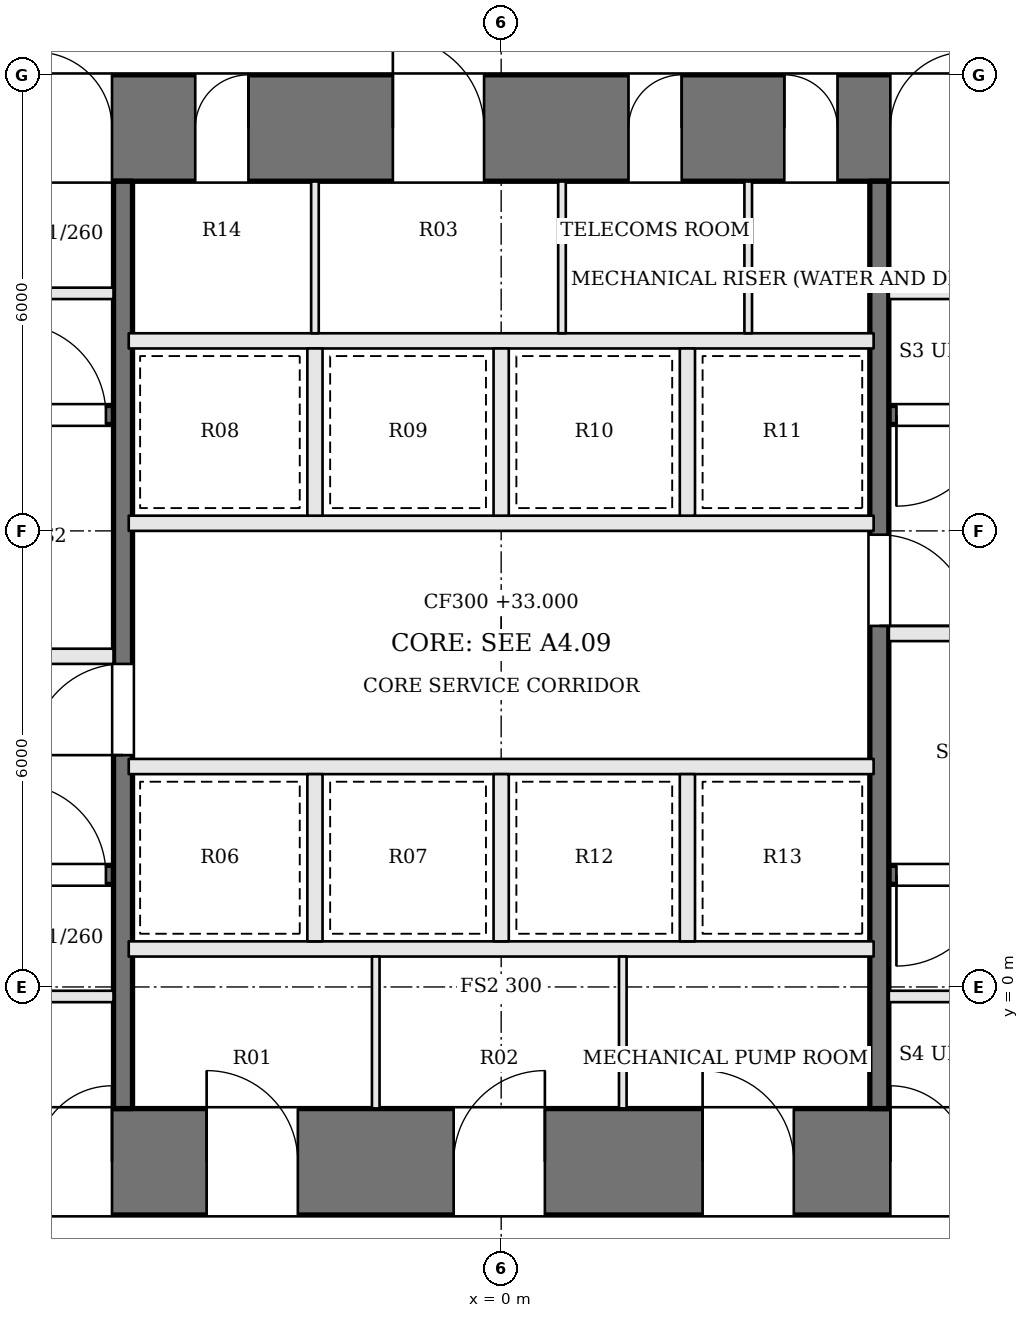
"""IFC4 building model, lengths in metres.
Left out: names, types, materials, properties, quantities, classifications, styles, units other than length and angle.
Written with IfcOpenShell. Run it as: python <this file> out.ifc"""

import sys

from ifc_helpers import new_model, si_unit, direction, frame, frame_2d, origin, place, context, subcontext, project, spatial, rectangle, extrude, element, fill, save


model = new_model("IFC4")
c1 = context("Model", 3, precision=1e-05, world=origin(), true_north=direction((0.0, 1.0)))
c2 = subcontext(c1, "Body", "Model", "MODEL_VIEW")
j1 = project(units=[si_unit("LENGTHUNIT", "METRE"), si_unit("PLANEANGLEUNIT", "RADIAN")], contexts=[c1])
p1 = place(None, origin())
s1 = spatial("IfcSite", under=j1, at=p1, CompositionType="ELEMENT")
p2 = place(p1, origin())
s2 = spatial("IfcBuilding", under=s1, at=p2, CompositionType="ELEMENT")
p3 = place(p2, frame((0.0, 0.0, 33.0)))
s3 = spatial("IfcBuildingStorey", under=s2, at=p3, CompositionType="ELEMENT", Elevation=33.0)
p4 = place(p3, frame((-13.0, 11.3, 0.0), z_axis=(0.0, 0.0, 1.0), x_axis=(1.0, 0.0, 0.0)))
e1 = element("IfcWall", 1, at=p4, inside=s3, PredefinedType="SHEAR", context=c2, shape_type="SweptSolid", body=[
    extrude(rectangle(XDim=26.0, YDim=1.4, at=frame_2d((13.0, 0.0))), origin(), (0.0, 0.0, 1.0), 4.5),
])
p5 = place(p4, frame((8.975, 0.0, 0.0)))
e2 = element("IfcOpeningElement", 2, at=p5, cuts=e1, PredefinedType="OPENING", context=c2, shape_type="SweptSolid", body=[
    extrude(rectangle(XDim=0.7, YDim=2.1, at=frame_2d((0.35, 1.05))), frame((0.0, 0.71, 0.0), z_axis=(0.0, -1.0, 0.0), x_axis=(1.0, 0.0, 0.0)), (0.0, 0.0, 1.0), 1.42),
])
p6 = place(p4, frame((11.575, 0.0, 0.0)))
e3 = element("IfcOpeningElement", 3, at=p6, cuts=e1, PredefinedType="OPENING", context=c2, shape_type="SweptSolid", body=[
    extrude(rectangle(XDim=1.2, YDim=2.1, at=frame_2d((0.6, 1.05))), frame((0.0, 0.71, 0.0), z_axis=(0.0, -1.0, 0.0), x_axis=(1.0, 0.0, 0.0)), (0.0, 0.0, 1.0), 1.42),
])
p7 = place(p4, frame((14.675, 0.0, 0.0)))
e4 = element("IfcOpeningElement", 4, at=p7, cuts=e1, PredefinedType="OPENING", context=c2, shape_type="SweptSolid", body=[
    extrude(rectangle(XDim=0.7, YDim=2.1, at=frame_2d((0.35, 1.05))), frame((0.0, 0.71, 0.0), z_axis=(0.0, -1.0, 0.0), x_axis=(1.0, 0.0, 0.0)), (0.0, 0.0, 1.0), 1.42),
])
p8 = place(p4, frame((16.725, 0.0, 0.0)))
e5 = element("IfcOpeningElement", 5, at=p8, cuts=e1, PredefinedType="OPENING", context=c2, shape_type="SweptSolid", body=[
    extrude(rectangle(XDim=0.7, YDim=2.1, at=frame_2d((0.35, 1.05))), frame((0.0, 0.71, 0.0), z_axis=(0.0, -1.0, 0.0), x_axis=(1.0, 0.0, 0.0)), (0.0, 0.0, 1.0), 1.42),
])
p9 = place(p4, frame((6.88, 0.0, 0.0)))
e6 = element("IfcOpeningElement", 6, at=p9, cuts=e1, PredefinedType="OPENING", context=c2, shape_type="SweptSolid", body=[
    extrude(rectangle(XDim=1.0, YDim=2.1, at=frame_2d((0.5, 1.05))), frame((0.0, 0.71, 0.0), z_axis=(0.0, -1.0, 0.0), x_axis=(1.0, 0.0, 0.0)), (0.0, 0.0, 1.0), 1.42),
])
p10 = place(p4, frame((18.12, 0.0, 0.0)))
e7 = element("IfcOpeningElement", 7, at=p10, cuts=e1, PredefinedType="OPENING", context=c2, shape_type="SweptSolid", body=[
    extrude(rectangle(XDim=1.0, YDim=2.1, at=frame_2d((0.5, 1.05))), frame((0.0, 0.71, 0.0), z_axis=(0.0, -1.0, 0.0), x_axis=(1.0, 0.0, 0.0)), (0.0, 0.0, 1.0), 1.42),
])
p11 = place(p3, frame((-13.0, -2.3, 0.0), z_axis=(0.0, 0.0, 1.0), x_axis=(1.0, 0.0, 0.0)))
e8 = element("IfcWall", 8, at=p11, inside=s3, PredefinedType="SHEAR", context=c2, shape_type="SweptSolid", body=[
    extrude(rectangle(XDim=26.0, YDim=1.4, at=frame_2d((13.0, 0.0))), origin(), (0.0, 0.0, 1.0), 4.5),
])
p12 = place(p11, frame((9.125, 0.0, 0.0)))
e9 = element("IfcOpeningElement", 9, at=p12, cuts=e8, PredefinedType="OPENING", context=c2, shape_type="SweptSolid", body=[
    extrude(rectangle(XDim=1.2, YDim=2.1, at=frame_2d((0.6, 1.05))), frame((0.0, 0.71, 0.0), z_axis=(0.0, -1.0, 0.0), x_axis=(1.0, 0.0, 0.0)), (0.0, 0.0, 1.0), 1.42),
])
p13 = place(p11, frame((12.375, 0.0, 0.0)))
e10 = element("IfcOpeningElement", 10, at=p13, cuts=e8, PredefinedType="OPENING", context=c2, shape_type="SweptSolid", body=[
    extrude(rectangle(XDim=1.2, YDim=2.1, at=frame_2d((0.6, 1.05))), frame((0.0, 0.71, 0.0), z_axis=(0.0, -1.0, 0.0), x_axis=(1.0, 0.0, 0.0)), (0.0, 0.0, 1.0), 1.42),
])
p14 = place(p11, frame((15.65, 0.0, 0.0)))
e11 = element("IfcOpeningElement", 11, at=p14, cuts=e8, PredefinedType="OPENING", context=c2, shape_type="SweptSolid", body=[
    extrude(rectangle(XDim=1.2, YDim=2.1, at=frame_2d((0.6, 1.05))), frame((0.0, 0.71, 0.0), z_axis=(0.0, -1.0, 0.0), x_axis=(1.0, 0.0, 0.0)), (0.0, 0.0, 1.0), 1.42),
])
p15 = place(p11, frame((6.88, 0.0, 0.0)))
e12 = element("IfcOpeningElement", 12, at=p15, cuts=e8, PredefinedType="OPENING", context=c2, shape_type="SweptSolid", body=[
    extrude(rectangle(XDim=1.0, YDim=2.1, at=frame_2d((0.5, 1.05))), frame((0.0, 0.71, 0.0), z_axis=(0.0, -1.0, 0.0), x_axis=(1.0, 0.0, 0.0)), (0.0, 0.0, 1.0), 1.42),
])
p16 = place(p11, frame((18.12, 0.0, 0.0)))
e13 = element("IfcOpeningElement", 13, at=p16, cuts=e8, PredefinedType="OPENING", context=c2, shape_type="SweptSolid", body=[
    extrude(rectangle(XDim=1.0, YDim=2.1, at=frame_2d((0.5, 1.05))), frame((0.0, 0.71, 0.0), z_axis=(0.0, -1.0, 0.0), x_axis=(1.0, 0.0, 0.0)), (0.0, 0.0, 1.0), 1.42),
])
for number, where, z_axis, x_axis in (
    (14, (-6.4, -0.125, 0.0), (0.0, 0.0, 1.0), (1.0, 0.0, 0.0)),
    (15, (6.4, 9.125, 0.0), (0.0, 0.0, 1.0), (-1.0, 0.0, 0.0)),
    (16, (-6.4, 9.125, 0.0), (0.0, 0.0, 1.0), (1.0, 0.0, 0.0)),
    (17, (6.4, -0.125, 0.0), (0.0, 0.0, 1.0), (-1.0, 0.0, 0.0)),
):
    element("IfcWall", number, at=place(p3, frame(where, z_axis=z_axis, x_axis=x_axis)), inside=s3, PredefinedType="SOLIDWALL", context=c2, shape_type="SweptSolid", body=[
        extrude(rectangle(XDim=1.3, YDim=0.15, at=frame_2d((0.65, 0.0))), origin(), (0.0, 0.0, 1.0), 4.3),
    ])
p17 = place(p3, frame((-11.6, 1.475, 0.0), z_axis=(0.0, 0.0, 1.0), x_axis=(1.0, 0.0, 0.0)))
e18 = element("IfcWall", 18, at=p17, inside=s3, PredefinedType="SOLIDWALL", context=c2, shape_type="SweptSolid", body=[
    extrude(rectangle(XDim=6.5, YDim=0.25, at=frame_2d((3.25, 0.0))), origin(), (0.0, 0.0, 1.0), 4.3),
])
p18 = place(p17, frame((5.2, 0.0, 0.0)))
e19 = element("IfcOpeningElement", 19, at=p18, cuts=e18, PredefinedType="OPENING", context=c2, shape_type="SweptSolid", body=[
    extrude(rectangle(XDim=1.2, YDim=2.1, at=frame_2d((0.6, 1.05))), frame((0.0, 0.135, 0.0), z_axis=(0.0, -1.0, 0.0), x_axis=(1.0, 0.0, 0.0)), (0.0, 0.0, 1.0), 0.27),
])
p19 = place(p3, frame((11.6, 7.525, 0.0), z_axis=(0.0, 0.0, 1.0), x_axis=(-1.0, 0.0, 0.0)))
e20 = element("IfcWall", 20, at=p19, inside=s3, PredefinedType="SOLIDWALL", context=c2, shape_type="SweptSolid", body=[
    extrude(rectangle(XDim=6.5, YDim=0.25, at=frame_2d((3.25, 0.0))), origin(), (0.0, 0.0, 1.0), 4.3),
])
p20 = place(p19, frame((5.2, 0.0, 0.0)))
e21 = element("IfcOpeningElement", 21, at=p20, cuts=e20, PredefinedType="OPENING", context=c2, shape_type="SweptSolid", body=[
    extrude(rectangle(XDim=1.2, YDim=2.1, at=frame_2d((0.6, 1.05))), frame((0.0, 0.135, 0.0), z_axis=(0.0, -1.0, 0.0), x_axis=(1.0, 0.0, 0.0)), (0.0, 0.0, 1.0), 0.27),
])
p21 = place(p3, frame((-11.6, 4.35, 0.0), z_axis=(0.0, 0.0, 1.0), x_axis=(1.0, 0.0, 0.0)))
e22 = element("IfcWall", 22, at=p21, inside=s3, PredefinedType="SOLIDWALL", context=c2, shape_type="SweptSolid", body=[
    extrude(rectangle(XDim=6.5, YDim=0.2, at=frame_2d((3.25, 0.0))), origin(), (0.0, 0.0, 1.0), 4.3),
])
p22 = place(p21, frame((3.8, 0.0, 0.0)))
e23 = element("IfcOpeningElement", 23, at=p22, cuts=e22, PredefinedType="OPENING", context=c2, shape_type="SweptSolid", body=[
    extrude(rectangle(XDim=1.2, YDim=2.1, at=frame_2d((0.6, 1.05))), frame((0.0, 0.11, 0.0), z_axis=(0.0, -1.0, 0.0), x_axis=(1.0, 0.0, 0.0)), (0.0, 0.0, 1.0), 0.22),
])
p23 = place(p21, frame((0.5, 0.0, 0.0)))
e24 = element("IfcOpeningElement", 24, at=p23, cuts=e22, PredefinedType="OPENING", context=c2, shape_type="SweptSolid", body=[
    extrude(rectangle(XDim=1.2, YDim=2.1, at=frame_2d((0.6, 1.05))), frame((0.0, 0.11, 0.0), z_axis=(0.0, -1.0, 0.0), x_axis=(1.0, 0.0, 0.0)), (0.0, 0.0, 1.0), 0.22),
])
p24 = place(p3, frame((11.6, 4.65, 0.0), z_axis=(0.0, 0.0, 1.0), x_axis=(-1.0, 0.0, 0.0)))
e25 = element("IfcWall", 25, at=p24, inside=s3, PredefinedType="SOLIDWALL", context=c2, shape_type="SweptSolid", body=[
    extrude(rectangle(XDim=6.5, YDim=0.2, at=frame_2d((3.25, 0.0))), origin(), (0.0, 0.0, 1.0), 4.3),
])
p25 = place(p24, frame((3.8, 0.0, 0.0)))
e26 = element("IfcOpeningElement", 26, at=p25, cuts=e25, PredefinedType="OPENING", context=c2, shape_type="SweptSolid", body=[
    extrude(rectangle(XDim=1.2, YDim=2.1, at=frame_2d((0.6, 1.05))), frame((0.0, 0.11, 0.0), z_axis=(0.0, -1.0, 0.0), x_axis=(1.0, 0.0, 0.0)), (0.0, 0.0, 1.0), 0.22),
])
p26 = place(p24, frame((0.5, 0.0, 0.0)))
e27 = element("IfcOpeningElement", 27, at=p26, cuts=e25, PredefinedType="OPENING", context=c2, shape_type="SweptSolid", body=[
    extrude(rectangle(XDim=1.2, YDim=2.1, at=frame_2d((0.6, 1.05))), frame((0.0, 0.11, 0.0), z_axis=(0.0, -1.0, 0.0), x_axis=(1.0, 0.0, 0.0)), (0.0, 0.0, 1.0), 0.22),
])
p27 = place(p3, frame((-11.6, 7.525, 0.0), z_axis=(0.0, 0.0, 1.0), x_axis=(1.0, 0.0, 0.0)))
e28 = element("IfcWall", 28, at=p27, inside=s3, PredefinedType="SOLIDWALL", context=c2, shape_type="SweptSolid", body=[
    extrude(rectangle(XDim=6.5, YDim=0.25, at=frame_2d((3.25, 0.0))), origin(), (0.0, 0.0, 1.0), 4.3),
])
p28 = place(p27, frame((5.2, 0.0, 0.0)))
e29 = element("IfcOpeningElement", 29, at=p28, cuts=e28, PredefinedType="OPENING", context=c2, shape_type="SweptSolid", body=[
    extrude(rectangle(XDim=1.2, YDim=2.1, at=frame_2d((0.6, 1.05))), frame((0.0, 0.135, 0.0), z_axis=(0.0, -1.0, 0.0), x_axis=(1.0, 0.0, 0.0)), (0.0, 0.0, 1.0), 0.27),
])
p29 = place(p3, frame((11.6, 1.475, 0.0), z_axis=(0.0, 0.0, 1.0), x_axis=(-1.0, 0.0, 0.0)))
e30 = element("IfcWall", 30, at=p29, inside=s3, PredefinedType="SOLIDWALL", context=c2, shape_type="SweptSolid", body=[
    extrude(rectangle(XDim=6.5, YDim=0.25, at=frame_2d((3.25, 0.0))), origin(), (0.0, 0.0, 1.0), 4.3),
])
p30 = place(p29, frame((5.2, 0.0, 0.0)))
e31 = element("IfcOpeningElement", 31, at=p30, cuts=e30, PredefinedType="OPENING", context=c2, shape_type="SweptSolid", body=[
    extrude(rectangle(XDim=1.2, YDim=2.1, at=frame_2d((0.6, 1.05))), frame((0.0, 0.135, 0.0), z_axis=(0.0, -1.0, 0.0), x_axis=(1.0, 0.0, 0.0)), (0.0, 0.0, 1.0), 0.27),
])
p31 = place(p3, frame((-4.975, -1.6, 0.0), z_axis=(0.0, 0.0, 1.0), x_axis=(0.0, 1.0, 0.0)))
e32 = element("IfcWall", 32, at=p31, inside=s3, PredefinedType="SOLIDWALL", context=c2, shape_type="SweptSolid", body=[
    extrude(rectangle(XDim=12.2, YDim=0.25, at=frame_2d((6.1, 0.0))), origin(), (0.0, 0.0, 1.0), 4.3),
])
p32 = place(p31, frame((4.65, 0.0, 0.0)))
e33 = element("IfcOpeningElement", 33, at=p32, cuts=e32, PredefinedType="OPENING", context=c2, shape_type="SweptSolid", body=[
    extrude(rectangle(XDim=1.2, YDim=2.1, at=frame_2d((0.6, 1.05))), frame((0.0, 0.135, 0.0), z_axis=(0.0, -1.0, 0.0), x_axis=(1.0, 0.0, 0.0)), (0.0, 0.0, 1.0), 0.27),
])
p33 = place(p3, frame((4.975, 10.6, 0.0), z_axis=(0.0, 0.0, 1.0), x_axis=(0.0, -1.0, 0.0)))
e34 = element("IfcWall", 34, at=p33, inside=s3, PredefinedType="SOLIDWALL", context=c2, shape_type="SweptSolid", body=[
    extrude(rectangle(XDim=12.2, YDim=0.25, at=frame_2d((6.1, 0.0))), origin(), (0.0, 0.0, 1.0), 4.3),
])
p34 = place(p33, frame((4.65, 0.0, 0.0)))
e35 = element("IfcOpeningElement", 35, at=p34, cuts=e34, PredefinedType="OPENING", context=c2, shape_type="SweptSolid", body=[
    extrude(rectangle(XDim=1.2, YDim=2.1, at=frame_2d((0.6, 1.05))), frame((0.0, 0.135, 0.0), z_axis=(0.0, -1.0, 0.0), x_axis=(1.0, 0.0, 0.0)), (0.0, 0.0, 1.0), 0.27),
])
for number, where, z_axis, x_axis in (
    (36, (-4.9, 0.5, 0.0), (0.0, 0.0, 1.0), (1.0, 0.0, 0.0)),
    (37, (-4.9, 2.9, 0.0), (0.0, 0.0, 1.0), (1.0, 0.0, 0.0)),
    (38, (-4.9, 6.1, 0.0), (0.0, 0.0, 1.0), (1.0, 0.0, 0.0)),
    (39, (-4.9, 8.5, 0.0), (0.0, 0.0, 1.0), (1.0, 0.0, 0.0)),
):
    element("IfcWall", number, at=place(p3, frame(where, z_axis=z_axis, x_axis=x_axis)), inside=s3, PredefinedType="SOLIDWALL", context=c2, shape_type="SweptSolid", body=[
        extrude(rectangle(XDim=9.8, YDim=0.2, at=frame_2d((4.9, 0.0))), origin(), (0.0, 0.0, 1.0), 4.3),
    ])
for number, where, z_axis, x_axis in (
    (40, (-2.45, 0.6, 0.0), (0.0, 0.0, 1.0), (0.0, 1.0, 0.0)),
    (41, (0.0, 0.6, 0.0), (0.0, 0.0, 1.0), (0.0, 1.0, 0.0)),
    (42, (2.45, 0.6, 0.0), (0.0, 0.0, 1.0), (0.0, 1.0, 0.0)),
    (43, (-2.45, 6.2, 0.0), (0.0, 0.0, 1.0), (0.0, 1.0, 0.0)),
    (44, (0.0, 6.2, 0.0), (0.0, 0.0, 1.0), (0.0, 1.0, 0.0)),
    (45, (2.45, 6.2, 0.0), (0.0, 0.0, 1.0), (0.0, 1.0, 0.0)),
):
    element("IfcWall", number, at=place(p3, frame(where, z_axis=z_axis, x_axis=x_axis)), inside=s3, PredefinedType="SOLIDWALL", context=c2, shape_type="SweptSolid", body=[
        extrude(rectangle(XDim=2.2, YDim=0.2, at=frame_2d((1.1, 0.0))), origin(), (0.0, 0.0, 1.0), 4.3),
    ])
for number, where, z_axis, x_axis in (
    (46, (-1.65, -1.6, 0.0), (0.0, 0.0, 1.0), (0.0, 1.0, 0.0)),
    (47, (1.6, -1.6, 0.0), (0.0, 0.0, 1.0), (0.0, 1.0, 0.0)),
    (48, (-2.45, 8.6, 0.0), (0.0, 0.0, 1.0), (0.0, 1.0, 0.0)),
    (49, (0.8, 8.6, 0.0), (0.0, 0.0, 1.0), (0.0, 1.0, 0.0)),
    (50, (3.25, 8.6, 0.0), (0.0, 0.0, 1.0), (0.0, 1.0, 0.0)),
):
    element("IfcWall", number, at=place(p3, frame(where, z_axis=z_axis, x_axis=x_axis)), inside=s3, PredefinedType="PARTITIONING", context=c2, shape_type="SweptSolid", body=[
        extrude(rectangle(XDim=2.0, YDim=0.1, at=frame_2d((1.0, 0.0))), origin(), (0.0, 0.0, 1.0), 4.3),
    ])
p35 = place(p32, origin())
e51 = element("IfcDoor", 51, at=p35, inside=s3, OperationType="SINGLE_SWING_LEFT", PredefinedType="DOOR", context=c2, shape_type="SweptSolid", body=[
    extrude(rectangle(XDim=1.2, YDim=2.1, at=frame_2d((0.6, 1.05))), frame((0.0, 0.025, 0.0), z_axis=(0.0, -1.0, 0.0), x_axis=(1.0, 0.0, 0.0)), (0.0, 0.0, 1.0), 0.05),
])
fill(e33, e51)
p36 = place(p34, origin())
e52 = element("IfcDoor", 52, at=p36, inside=s3, OperationType="SINGLE_SWING_RIGHT", PredefinedType="DOOR", context=c2, shape_type="SweptSolid", body=[
    extrude(rectangle(XDim=1.2, YDim=2.1, at=frame_2d((0.6, 1.05))), frame((0.0, 0.025, 0.0), z_axis=(0.0, -1.0, 0.0), x_axis=(1.0, 0.0, 0.0)), (0.0, 0.0, 1.0), 0.05),
])
fill(e35, e52)
p37 = place(p18, origin())
e53 = element("IfcDoor", 53, at=p37, inside=s3, OperationType="SINGLE_SWING_LEFT", PredefinedType="DOOR", context=c2, shape_type="SweptSolid", body=[
    extrude(rectangle(XDim=1.2, YDim=2.1, at=frame_2d((0.6, 1.05))), frame((0.0, 0.025, 0.0), z_axis=(0.0, -1.0, 0.0), x_axis=(1.0, 0.0, 0.0)), (0.0, 0.0, 1.0), 0.05),
])
fill(e19, e53)
p38 = place(p20, origin())
e54 = element("IfcDoor", 54, at=p38, inside=s3, OperationType="SINGLE_SWING_RIGHT", PredefinedType="DOOR", context=c2, shape_type="SweptSolid", body=[
    extrude(rectangle(XDim=1.2, YDim=2.1, at=frame_2d((0.6, 1.05))), frame((0.0, 0.025, 0.0), z_axis=(0.0, -1.0, 0.0), x_axis=(1.0, 0.0, 0.0)), (0.0, 0.0, 1.0), 0.05),
])
fill(e21, e54)
p39 = place(p28, origin())
e55 = element("IfcDoor", 55, at=p39, inside=s3, OperationType="SINGLE_SWING_LEFT", PredefinedType="DOOR", context=c2, shape_type="SweptSolid", body=[
    extrude(rectangle(XDim=1.2, YDim=2.1, at=frame_2d((0.6, 1.05))), frame((0.0, 0.025, 0.0), z_axis=(0.0, -1.0, 0.0), x_axis=(1.0, 0.0, 0.0)), (0.0, 0.0, 1.0), 0.05),
])
fill(e29, e55)
p40 = place(p30, origin())
e56 = element("IfcDoor", 56, at=p40, inside=s3, OperationType="SINGLE_SWING_RIGHT", PredefinedType="DOOR", context=c2, shape_type="SweptSolid", body=[
    extrude(rectangle(XDim=1.2, YDim=2.1, at=frame_2d((0.6, 1.05))), frame((0.0, 0.025, 0.0), z_axis=(0.0, -1.0, 0.0), x_axis=(1.0, 0.0, 0.0)), (0.0, 0.0, 1.0), 0.05),
])
fill(e31, e56)
p41 = place(p12, origin())
e57 = element("IfcDoor", 57, at=p41, inside=s3, OperationType="SINGLE_SWING_LEFT", PredefinedType="DOOR", context=c2, shape_type="SweptSolid", body=[
    extrude(rectangle(XDim=1.2, YDim=2.1, at=frame_2d((0.6, 1.05))), frame((0.0, 0.025, 0.0), z_axis=(0.0, -1.0, 0.0), x_axis=(1.0, 0.0, 0.0)), (0.0, 0.0, 1.0), 0.05),
])
fill(e9, e57)
p42 = place(p13, origin())
e58 = element("IfcDoor", 58, at=p42, inside=s3, OperationType="SINGLE_SWING_RIGHT", PredefinedType="DOOR", context=c2, shape_type="SweptSolid", body=[
    extrude(rectangle(XDim=1.2, YDim=2.1, at=frame_2d((0.6, 1.05))), frame((0.0, 0.025, 0.0), z_axis=(0.0, -1.0, 0.0), x_axis=(1.0, 0.0, 0.0)), (0.0, 0.0, 1.0), 0.05),
])
fill(e10, e58)
p43 = place(p14, origin())
e59 = element("IfcDoor", 59, at=p43, inside=s3, OperationType="SINGLE_SWING_LEFT", PredefinedType="DOOR", context=c2, shape_type="SweptSolid", body=[
    extrude(rectangle(XDim=1.2, YDim=2.1, at=frame_2d((0.6, 1.05))), frame((0.0, 0.025, 0.0), z_axis=(0.0, -1.0, 0.0), x_axis=(1.0, 0.0, 0.0)), (0.0, 0.0, 1.0), 0.05),
])
fill(e11, e59)
p44 = place(p5, origin())
e60 = element("IfcDoor", 60, at=p44, inside=s3, OperationType="SINGLE_SWING_RIGHT", PredefinedType="DOOR", context=c2, shape_type="SweptSolid", body=[
    extrude(rectangle(XDim=0.7, YDim=2.1, at=frame_2d((0.35, 1.05))), frame((0.0, 0.025, 0.0), z_axis=(0.0, -1.0, 0.0), x_axis=(1.0, 0.0, 0.0)), (0.0, 0.0, 1.0), 0.05),
])
fill(e2, e60)
p45 = place(p6, origin())
e61 = element("IfcDoor", 61, at=p45, inside=s3, OperationType="SINGLE_SWING_LEFT", PredefinedType="DOOR", context=c2, shape_type="SweptSolid", body=[
    extrude(rectangle(XDim=1.2, YDim=2.1, at=frame_2d((0.6, 1.05))), frame((0.0, 0.025, 0.0), z_axis=(0.0, -1.0, 0.0), x_axis=(1.0, 0.0, 0.0)), (0.0, 0.0, 1.0), 0.05),
])
fill(e3, e61)
p46 = place(p7, origin())
e62 = element("IfcDoor", 62, at=p46, inside=s3, OperationType="SINGLE_SWING_RIGHT", PredefinedType="DOOR", context=c2, shape_type="SweptSolid", body=[
    extrude(rectangle(XDim=0.7, YDim=2.1, at=frame_2d((0.35, 1.05))), frame((0.0, 0.025, 0.0), z_axis=(0.0, -1.0, 0.0), x_axis=(1.0, 0.0, 0.0)), (0.0, 0.0, 1.0), 0.05),
])
fill(e4, e62)
p47 = place(p8, origin())
e63 = element("IfcDoor", 63, at=p47, inside=s3, OperationType="SINGLE_SWING_LEFT", PredefinedType="DOOR", context=c2, shape_type="SweptSolid", body=[
    extrude(rectangle(XDim=0.7, YDim=2.1, at=frame_2d((0.35, 1.05))), frame((0.0, 0.025, 0.0), z_axis=(0.0, -1.0, 0.0), x_axis=(1.0, 0.0, 0.0)), (0.0, 0.0, 1.0), 0.05),
])
fill(e5, e63)
p48 = place(p15, origin())
e64 = element("IfcDoor", 64, at=p48, inside=s3, OperationType="SINGLE_SWING_RIGHT", PredefinedType="DOOR", context=c2, shape_type="SweptSolid", body=[
    extrude(rectangle(XDim=1.0, YDim=2.1, at=frame_2d((0.5, 1.05))), frame((0.0, 0.025, 0.0), z_axis=(0.0, -1.0, 0.0), x_axis=(1.0, 0.0, 0.0)), (0.0, 0.0, 1.0), 0.05),
])
fill(e12, e64)
p49 = place(p9, origin())
e65 = element("IfcDoor", 65, at=p49, inside=s3, OperationType="SINGLE_SWING_LEFT", PredefinedType="DOOR", context=c2, shape_type="SweptSolid", body=[
    extrude(rectangle(XDim=1.0, YDim=2.1, at=frame_2d((0.5, 1.05))), frame((0.0, 0.025, 0.0), z_axis=(0.0, -1.0, 0.0), x_axis=(1.0, 0.0, 0.0)), (0.0, 0.0, 1.0), 0.05),
])
fill(e6, e65)
p50 = place(p10, origin())
e66 = element("IfcDoor", 66, at=p50, inside=s3, OperationType="SINGLE_SWING_RIGHT", PredefinedType="DOOR", context=c2, shape_type="SweptSolid", body=[
    extrude(rectangle(XDim=1.0, YDim=2.1, at=frame_2d((0.5, 1.05))), frame((0.0, 0.025, 0.0), z_axis=(0.0, -1.0, 0.0), x_axis=(1.0, 0.0, 0.0)), (0.0, 0.0, 1.0), 0.05),
])
fill(e7, e66)
p51 = place(p16, origin())
e67 = element("IfcDoor", 67, at=p51, inside=s3, OperationType="SINGLE_SWING_LEFT", PredefinedType="DOOR", context=c2, shape_type="SweptSolid", body=[
    extrude(rectangle(XDim=1.0, YDim=2.1, at=frame_2d((0.5, 1.05))), frame((0.0, 0.025, 0.0), z_axis=(0.0, -1.0, 0.0), x_axis=(1.0, 0.0, 0.0)), (0.0, 0.0, 1.0), 0.05),
])
fill(e13, e67)
save(model, sys.argv[1])
